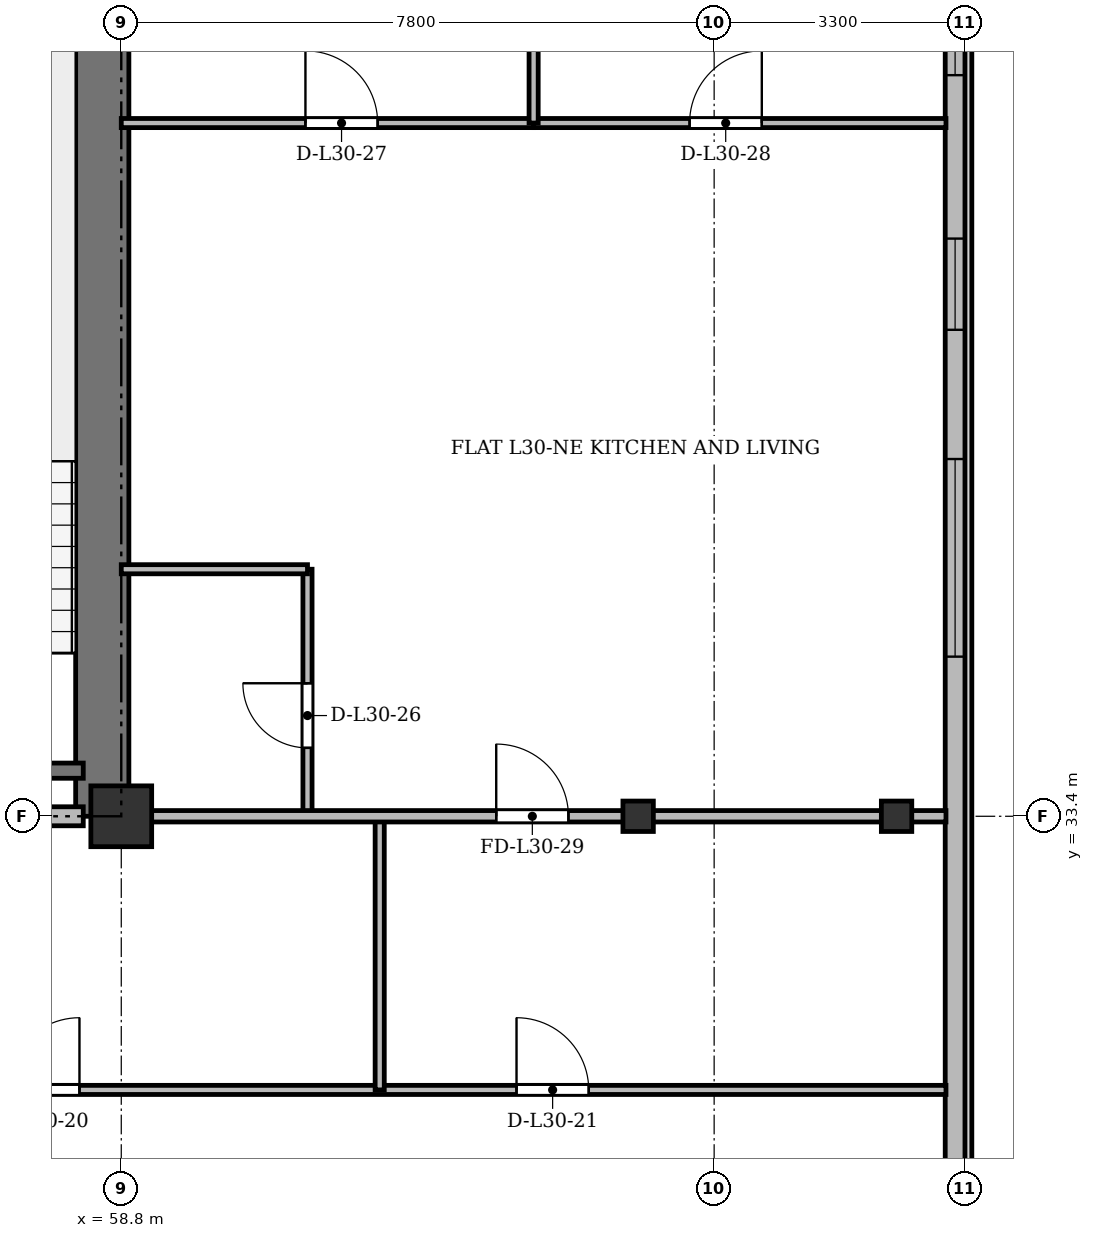
"""IFC4 building model, lengths in metres.
Left out: names, types, materials, properties, quantities, classifications, styles, units other than length and angle.
Written with IfcOpenShell. Run it as: python <this file> out.ifc"""

import sys

from ifc_helpers import new_model, si_unit, direction, frame, frame_2d, origin, origin_2d, place, context, subcontext, project, spatial, rectangle, i_section, extrude, source, transform, mapped, element, fill, save


model = new_model("IFC4")
c1 = context("Model", 3, precision=1e-05, world=origin(), true_north=direction((0.0, 1.0)))
c2 = subcontext(c1, "Body", "Model", "MODEL_VIEW")
j1 = project(units=[si_unit("LENGTHUNIT", "METRE"), si_unit("PLANEANGLEUNIT", "RADIAN")], contexts=[c1])
p1 = place(None, origin())
s1 = spatial("IfcSite", under=j1, at=p1, CompositionType="ELEMENT")
p2 = place(p1, origin())
s2 = spatial("IfcBuilding", under=s1, at=p2, CompositionType="ELEMENT")
p3 = place(p2, frame((0.0, 0.0, 117.7)))
s3 = spatial("IfcBuildingStorey", under=s2, at=p3, CompositionType="ELEMENT", Elevation=117.7)
m1 = source(origin(), c2, "Body", "SweptSolid", [
    extrude(rectangle(XDim=0.8, YDim=0.8, at=origin_2d()), origin(), (0.0, 0.0, 1.0), 3.6),
])
p4 = place(p3, frame((58.8, 33.4, 0.0), z_axis=(0.0, 0.0, 1.0), x_axis=(1.0, 0.0, 0.0)))
e1 = element("IfcColumn", 1, at=p4, inside=s3, PredefinedType="COLUMN", context=c2, shape_type="MappedRepresentation", body=[
    mapped(m1, transform((0.0, 0.0, 0.0), x_axis=(1.0, 0.0, 0.0), y_axis=(0.0, 1.0, 0.0), z_axis=(0.0, 0.0, 1.0), scale=1.0)),
])
m2 = source(origin(), c2, "Body", "SweptSolid", [
    extrude(i_section(OverallWidth=0.4, OverallDepth=0.4, WebThickness=0.022, FlangeThickness=0.035, at=origin_2d()), origin(), (0.0, 0.0, 1.0), 3.6),
])
for number, where, z_axis, x_axis in (
    (2, (65.6, 33.4, 0.0), (0.0, 0.0, 1.0), (1.0, 0.0, 0.0)),
    (3, (69.0, 33.4, 0.0), (0.0, 0.0, 1.0), (1.0, 0.0, 0.0)),
):
    element("IfcColumn", number, at=place(p3, frame(where, z_axis=z_axis, x_axis=x_axis)), inside=s3, PredefinedType="COLUMN", context=c2, shape_type="MappedRepresentation", body=[
        mapped(m2, transform((0.0, 0.0, 0.0), x_axis=(1.0, 0.0, 0.0), y_axis=(0.0, 1.0, 0.0), z_axis=(0.0, 0.0, 1.0), scale=1.0)),
    ])
p5 = place(p3, frame((69.77, 45.5, 0.0), z_axis=(0.0, 0.0, 1.0), x_axis=(0.0, -1.0, 0.0)))
e4 = element("IfcWall", 4, at=p5, inside=s3, PredefinedType="SOLIDWALL", context=c2, shape_type="SweptSolid", body=[
    extrude(rectangle(XDim=39.6, YDim=0.26, at=frame_2d((19.8, 0.0))), origin(), (0.0, 0.0, 1.0), 3.34),
])
p6 = place(p5, frame((36.95, 0.0, 0.92)))
e5 = element("IfcOpeningElement", 5, at=p6, cuts=e4, PredefinedType="OPENING", context=c2, shape_type="SweptSolid", body=[
    extrude(rectangle(XDim=1.2, YDim=1.65, at=frame_2d((0.6, 0.825))), frame((0.0, 0.14, 0.0), z_axis=(0.0, -1.0, 0.0), x_axis=(1.0, 0.0, 0.0)), (0.0, 0.0, 1.0), 0.28),
])
p7 = place(p5, frame((32.8, 0.0, 0.92)))
e6 = element("IfcOpeningElement", 6, at=p7, cuts=e4, PredefinedType="OPENING", context=c2, shape_type="SweptSolid", body=[
    extrude(rectangle(XDim=2.6, YDim=1.9, at=frame_2d((1.3, 0.95))), frame((0.0, 0.14, 0.0), z_axis=(0.0, -1.0, 0.0), x_axis=(1.0, 0.0, 0.0)), (0.0, 0.0, 1.0), 0.28),
])
p8 = place(p5, frame((28.6, 0.0, 0.92)))
e7 = element("IfcOpeningElement", 7, at=p8, cuts=e4, PredefinedType="OPENING", context=c2, shape_type="SweptSolid", body=[
    extrude(rectangle(XDim=2.6, YDim=1.9, at=frame_2d((1.3, 0.95))), frame((0.0, 0.14, 0.0), z_axis=(0.0, -1.0, 0.0), x_axis=(1.0, 0.0, 0.0)), (0.0, 0.0, 1.0), 0.28),
])
p9 = place(p5, frame((21.4, 0.0, 0.92)))
e8 = element("IfcOpeningElement", 8, at=p9, cuts=e4, PredefinedType="OPENING", context=c2, shape_type="SweptSolid", body=[
    extrude(rectangle(XDim=2.6, YDim=1.9, at=frame_2d((1.3, 0.95))), frame((0.0, 0.14, 0.0), z_axis=(0.0, -1.0, 0.0), x_axis=(1.0, 0.0, 0.0)), (0.0, 0.0, 1.0), 0.28),
])
p10 = place(p5, frame((7.4, 0.0, 0.92)))
e9 = element("IfcOpeningElement", 9, at=p10, cuts=e4, PredefinedType="OPENING", context=c2, shape_type="SweptSolid", body=[
    extrude(rectangle(XDim=2.6, YDim=1.9, at=frame_2d((1.3, 0.95))), frame((0.0, 0.14, 0.0), z_axis=(0.0, -1.0, 0.0), x_axis=(1.0, 0.0, 0.0)), (0.0, 0.0, 1.0), 0.28),
])
p11 = place(p5, frame((4.5, 0.0, 0.92)))
e10 = element("IfcOpeningElement", 10, at=p11, cuts=e4, PredefinedType="OPENING", context=c2, shape_type="SweptSolid", body=[
    extrude(rectangle(XDim=1.2, YDim=1.65, at=frame_2d((0.6, 0.825))), frame((0.0, 0.14, 0.0), z_axis=(0.0, -1.0, 0.0), x_axis=(1.0, 0.0, 0.0)), (0.0, 0.0, 1.0), 0.28),
])
p12 = place(p5, frame((1.15, 0.0, 0.92)))
e11 = element("IfcOpeningElement", 11, at=p12, cuts=e4, PredefinedType="OPENING", context=c2, shape_type="SweptSolid", body=[
    extrude(rectangle(XDim=1.2, YDim=1.65, at=frame_2d((0.6, 0.825))), frame((0.0, 0.14, 0.0), z_axis=(0.0, -1.0, 0.0), x_axis=(1.0, 0.0, 0.0)), (0.0, 0.0, 1.0), 0.28),
])
p13 = place(p3, frame((58.55, 33.4, 0.0), z_axis=(0.0, 0.0, 1.0), x_axis=(0.0, 1.0, 0.0)))
e12 = element("IfcWall", 12, at=p13, inside=s3, PredefinedType="SHEAR", context=c2, shape_type="SweptSolid", body=[
    extrude(rectangle(XDim=11.7, YDim=0.7, at=frame_2d((5.85, 0.0))), origin(), (0.0, 0.0, 1.0), 3.34),
])
p14 = place(p3, frame((54.9, 34.0, 0.0), z_axis=(0.0, 0.0, 1.0), x_axis=(1.0, 0.0, 0.0)))
e13 = element("IfcWall", 13, at=p14, inside=s3, PredefinedType="SHEAR", context=c2, shape_type="SweptSolid", body=[
    extrude(rectangle(XDim=3.4, YDim=0.2, at=frame_2d((1.7, 0.0))), origin(), (0.0, 0.0, 1.0), 3.34),
])
p15 = place(p3, frame((47.15, 33.4, 0.0), z_axis=(0.0, 0.0, 1.0), x_axis=(1.0, 0.0, 0.0)))
e14 = element("IfcWall", 14, at=p15, inside=s3, PredefinedType="PARTITIONING", context=c2, shape_type="SweptSolid", body=[
    extrude(rectangle(XDim=11.15, YDim=0.25, at=frame_2d((5.575, 0.0))), origin(), (0.0, 0.0, 1.0), 2.752),
])
p16 = place(p15, frame((0.7, 0.0, 0.0)))
e15 = element("IfcOpeningElement", 15, at=p16, cuts=e14, PredefinedType="OPENING", context=c2, shape_type="SweptSolid", body=[
    extrude(rectangle(XDim=0.95, YDim=2.15, at=frame_2d((0.475, 1.075))), frame((0.0, 0.135, 0.0), z_axis=(0.0, -1.0, 0.0), x_axis=(1.0, 0.0, 0.0)), (0.0, 0.0, 1.0), 0.27),
])
p17 = place(p15, frame((6.0, 0.0, 0.0)))
e16 = element("IfcOpeningElement", 16, at=p17, cuts=e14, PredefinedType="OPENING", context=c2, shape_type="SweptSolid", body=[
    extrude(rectangle(XDim=1.2, YDim=2.15, at=frame_2d((0.6, 1.075))), frame((0.0, 0.135, 0.0), z_axis=(0.0, -1.0, 0.0), x_axis=(1.0, 0.0, 0.0)), (0.0, 0.0, 1.0), 0.27),
])
p18 = place(p3, frame((54.8, 29.8, 0.0), z_axis=(0.0, 0.0, 1.0), x_axis=(1.0, 0.0, 0.0)))
e17 = element("IfcWall", 17, at=p18, inside=s3, PredefinedType="PARTITIONING", context=c2, shape_type="SweptSolid", body=[
    extrude(rectangle(XDim=14.85, YDim=0.12, at=frame_2d((7.425, 0.0))), origin(), (0.0, 0.0, 1.0), 2.84),
])
p19 = place(p18, frame((2.5, 0.0, 0.0)))
e18 = element("IfcOpeningElement", 18, at=p19, cuts=e17, PredefinedType="OPENING", context=c2, shape_type="SweptSolid", body=[
    extrude(rectangle(XDim=0.95, YDim=2.15, at=frame_2d((0.475, 1.075))), frame((0.0, 0.07, 0.0), z_axis=(0.0, -1.0, 0.0), x_axis=(1.0, 0.0, 0.0)), (0.0, 0.0, 1.0), 0.14),
])
p20 = place(p18, frame((9.2, 0.0, 0.0)))
e19 = element("IfcOpeningElement", 19, at=p20, cuts=e17, PredefinedType="OPENING", context=c2, shape_type="SweptSolid", body=[
    extrude(rectangle(XDim=0.95, YDim=2.15, at=frame_2d((0.475, 1.075))), frame((0.0, 0.07, 0.0), z_axis=(0.0, -1.0, 0.0), x_axis=(1.0, 0.0, 0.0)), (0.0, 0.0, 1.0), 0.14),
])
p21 = place(p3, frame((62.2, 29.8, 0.0), z_axis=(0.0, 0.0, 1.0), x_axis=(0.0, 1.0, 0.0)))
e20 = element("IfcWall", 20, at=p21, inside=s3, PredefinedType="PARTITIONING", context=c2, shape_type="SweptSolid", body=[
    extrude(rectangle(XDim=3.6, YDim=0.12, at=frame_2d((1.8, 0.0))), origin(), (0.0, 0.0, 1.0), 2.752),
])
p22 = place(p3, frame((61.25, 33.4, 0.0), z_axis=(0.0, 0.0, 1.0), x_axis=(0.0, 1.0, 0.0)))
e21 = element("IfcWall", 21, at=p22, inside=s3, PredefinedType="PARTITIONING", context=c2, shape_type="SweptSolid", body=[
    extrude(rectangle(XDim=3.25, YDim=0.12, at=frame_2d((1.625, 0.0))), origin(), (0.0, 0.0, 1.0), 2.752),
])
p23 = place(p22, frame((0.9, 0.0, 0.0)))
e22 = element("IfcOpeningElement", 22, at=p23, cuts=e21, PredefinedType="OPENING", context=c2, shape_type="SweptSolid", body=[
    extrude(rectangle(XDim=0.85, YDim=2.1, at=frame_2d((0.425, 1.05))), frame((0.0, 0.07, 0.0), z_axis=(0.0, -1.0, 0.0), x_axis=(1.0, 0.0, 0.0)), (0.0, 0.0, 1.0), 0.14),
])
p24 = place(p3, frame((58.8, 36.65, 0.0), z_axis=(0.0, 0.0, 1.0), x_axis=(1.0, 0.0, 0.0)))
e23 = element("IfcWall", 23, at=p24, inside=s3, PredefinedType="PARTITIONING", context=c2, shape_type="SweptSolid", body=[
    extrude(rectangle(XDim=2.45, YDim=0.12, at=frame_2d((1.225, 0.0))), origin(), (0.0, 0.0, 1.0), 2.84),
])
p25 = place(p3, frame((58.8, 42.52, 0.0), z_axis=(0.0, 0.0, 1.0), x_axis=(1.0, 0.0, 0.0)))
e24 = element("IfcWall", 24, at=p25, inside=s3, PredefinedType="PARTITIONING", context=c2, shape_type="SweptSolid", body=[
    extrude(rectangle(XDim=5.425, YDim=0.12, at=frame_2d((2.712, 0.0))), origin(), (0.0, 0.0, 1.0), 2.84),
])
p26 = place(p25, frame((2.423, 0.0, 0.0)))
e25 = element("IfcOpeningElement", 25, at=p26, cuts=e24, PredefinedType="OPENING", context=c2, shape_type="SweptSolid", body=[
    extrude(rectangle(XDim=0.95, YDim=2.15, at=frame_2d((0.475, 1.075))), frame((0.0, 0.07, 0.0), z_axis=(0.0, -1.0, 0.0), x_axis=(1.0, 0.0, 0.0)), (0.0, 0.0, 1.0), 0.14),
])
p27 = place(p3, frame((64.225, 42.52, 0.0), z_axis=(0.0, 0.0, 1.0), x_axis=(1.0, 0.0, 0.0)))
e26 = element("IfcWall", 26, at=p27, inside=s3, PredefinedType="PARTITIONING", context=c2, shape_type="SweptSolid", body=[
    extrude(rectangle(XDim=5.425, YDim=0.12, at=frame_2d((2.712, 0.0))), origin(), (0.0, 0.0, 1.0), 2.84),
])
p28 = place(p27, frame((2.052, 0.0, 0.0)))
e27 = element("IfcOpeningElement", 27, at=p28, cuts=e26, PredefinedType="OPENING", context=c2, shape_type="SweptSolid", body=[
    extrude(rectangle(XDim=0.95, YDim=2.15, at=frame_2d((0.475, 1.075))), frame((0.0, 0.07, 0.0), z_axis=(0.0, -1.0, 0.0), x_axis=(1.0, 0.0, 0.0)), (0.0, 0.0, 1.0), 0.14),
])
p29 = place(p3, frame((64.225, 42.52, 0.0), z_axis=(0.0, 0.0, 1.0), x_axis=(0.0, 1.0, 0.0)))
e28 = element("IfcWall", 28, at=p29, inside=s3, PredefinedType="PARTITIONING", context=c2, shape_type="SweptSolid", body=[
    extrude(rectangle(XDim=5.72, YDim=0.12, at=frame_2d((2.86, 0.0))), origin(), (0.0, 0.0, 1.0), 2.752),
])
p30 = place(p3, frame((58.8, 33.4, 0.0), z_axis=(0.0, 0.0, 1.0), x_axis=(1.0, 0.0, 0.0)))
e29 = element("IfcWall", 29, at=p30, inside=s3, PredefinedType="PARTITIONING", context=c2, shape_type="SweptSolid", body=[
    extrude(rectangle(XDim=10.85, YDim=0.15, at=frame_2d((5.425, 0.0))), origin(), (0.0, 0.0, 1.0), 2.752),
])
p31 = place(p30, frame((4.933, 0.0, 0.0)))
e30 = element("IfcOpeningElement", 30, at=p31, cuts=e29, PredefinedType="OPENING", context=c2, shape_type="SweptSolid", body=[
    extrude(rectangle(XDim=0.95, YDim=2.15, at=frame_2d((0.475, 1.075))), frame((0.0, 0.085, 0.0), z_axis=(0.0, -1.0, 0.0), x_axis=(1.0, 0.0, 0.0)), (0.0, 0.0, 1.0), 0.17),
])
m3 = source(origin(), c2, "Body", "SweptSolid", [
    extrude(rectangle(XDim=2.6, YDim=1.9, at=frame_2d((1.3, 0.95))), frame((0.0, 0.03, 0.0), z_axis=(0.0, -1.0, 0.0), x_axis=(1.0, 0.0, 0.0)), (0.0, 0.0, 1.0), 0.06),
])
p32 = place(p10, origin())
e31 = element("IfcWindow", 31, at=p32, inside=s3, PartitioningType="SINGLE_PANEL", PredefinedType="WINDOW", context=c2, shape_type="MappedRepresentation", body=[
    mapped(m3, transform((0.0, 0.0, 0.0), x_axis=(1.0, 0.0, 0.0), y_axis=(0.0, 1.0, 0.0), z_axis=(0.0, 0.0, 1.0), scale=1.0)),
])
fill(e9, e31)
m4 = source(origin(), c2, "Body", "SweptSolid", [
    extrude(rectangle(XDim=1.2, YDim=1.65, at=frame_2d((0.6, 0.825))), frame((0.0, 0.03, 0.0), z_axis=(0.0, -1.0, 0.0), x_axis=(1.0, 0.0, 0.0)), (0.0, 0.0, 1.0), 0.06),
])
p33 = place(p11, origin())
e32 = element("IfcWindow", 32, at=p33, inside=s3, PartitioningType="SINGLE_PANEL", PredefinedType="WINDOW", context=c2, shape_type="MappedRepresentation", body=[
    mapped(m4, transform((0.0, 0.0, 0.0), x_axis=(1.0, 0.0, 0.0), y_axis=(0.0, 1.0, 0.0), z_axis=(0.0, 0.0, 1.0), scale=1.0)),
])
fill(e10, e32)
p34 = place(p12, origin())
e33 = element("IfcWindow", 33, at=p34, inside=s3, PartitioningType="SINGLE_PANEL", PredefinedType="WINDOW", context=c2, shape_type="MappedRepresentation", body=[
    mapped(m4, transform((0.0, 0.0, 0.0), x_axis=(1.0, 0.0, 0.0), y_axis=(0.0, 1.0, 0.0), z_axis=(0.0, 0.0, 1.0), scale=1.0)),
])
fill(e11, e33)
m5 = source(origin(), c2, "Body", "SweptSolid", [
    extrude(rectangle(XDim=0.95, YDim=2.15, at=frame_2d((0.475, 1.075))), frame((0.0, 0.025, 0.0), z_axis=(0.0, -1.0, 0.0), x_axis=(1.0, 0.0, 0.0)), (0.0, 0.0, 1.0), 0.05),
])
p35 = place(p19, origin())
e34 = element("IfcDoor", 34, at=p35, inside=s3, OperationType="SINGLE_SWING_RIGHT", PredefinedType="DOOR", context=c2, shape_type="MappedRepresentation", body=[
    mapped(m5, transform((0.0, 0.0, 0.0), x_axis=(1.0, 0.0, 0.0), y_axis=(0.0, 1.0, 0.0), z_axis=(0.0, 0.0, 1.0), scale=1.0)),
])
fill(e18, e34)
p36 = place(p20, origin())
e35 = element("IfcDoor", 35, at=p36, inside=s3, OperationType="SINGLE_SWING_LEFT", PredefinedType="DOOR", context=c2, shape_type="MappedRepresentation", body=[
    mapped(m5, transform((0.0, 0.0, 0.0), x_axis=(1.0, 0.0, 0.0), y_axis=(0.0, 1.0, 0.0), z_axis=(0.0, 0.0, 1.0), scale=1.0)),
])
fill(e19, e35)
m6 = source(origin(), c2, "Body", "SweptSolid", [
    extrude(rectangle(XDim=0.85, YDim=2.1, at=frame_2d((0.425, 1.05))), frame((0.0, 0.025, 0.0), z_axis=(0.0, -1.0, 0.0), x_axis=(1.0, 0.0, 0.0)), (0.0, 0.0, 1.0), 0.05),
])
p37 = place(p23, origin())
e36 = element("IfcDoor", 36, at=p37, inside=s3, OperationType="SINGLE_SWING_RIGHT", PredefinedType="DOOR", context=c2, shape_type="MappedRepresentation", body=[
    mapped(m6, transform((0.0, 0.0, 0.0), x_axis=(1.0, 0.0, 0.0), y_axis=(0.0, 1.0, 0.0), z_axis=(0.0, 0.0, 1.0), scale=1.0)),
])
fill(e22, e36)
p38 = place(p26, origin())
e37 = element("IfcDoor", 37, at=p38, inside=s3, OperationType="SINGLE_SWING_LEFT", PredefinedType="DOOR", context=c2, shape_type="MappedRepresentation", body=[
    mapped(m5, transform((0.0, 0.0, 0.0), x_axis=(1.0, 0.0, 0.0), y_axis=(0.0, 1.0, 0.0), z_axis=(0.0, 0.0, 1.0), scale=1.0)),
])
fill(e25, e37)
p39 = place(p28, origin())
e38 = element("IfcDoor", 38, at=p39, inside=s3, OperationType="SINGLE_SWING_RIGHT", PredefinedType="DOOR", context=c2, shape_type="MappedRepresentation", body=[
    mapped(m5, transform((0.0, 0.0, 0.0), x_axis=(1.0, 0.0, 0.0), y_axis=(0.0, 1.0, 0.0), z_axis=(0.0, 0.0, 1.0), scale=1.0)),
])
fill(e27, e38)
p40 = place(p31, origin())
e39 = element("IfcDoor", 39, at=p40, inside=s3, OperationType="SINGLE_SWING_LEFT", PredefinedType="DOOR", context=c2, shape_type="MappedRepresentation", body=[
    mapped(m5, transform((0.0, 0.0, 0.0), x_axis=(1.0, 0.0, 0.0), y_axis=(0.0, 1.0, 0.0), z_axis=(0.0, 0.0, 1.0), scale=1.0)),
])
fill(e30, e39)
save(model, sys.argv[1])
